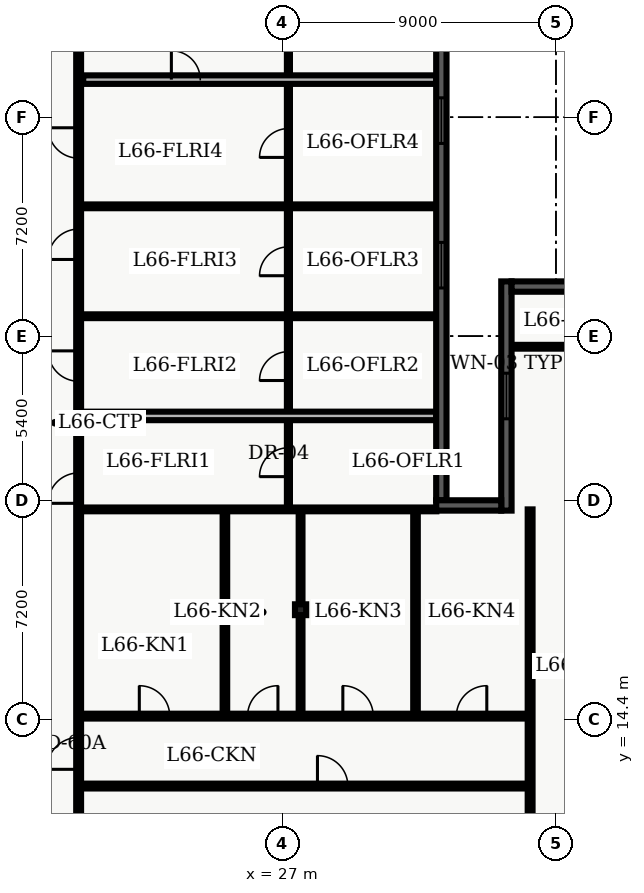
"""IFC4 building model, lengths in metres.
Left out: names, types, materials, properties, quantities, classifications, styles, units other than length and angle.
Written with IfcOpenShell. Run it as: python <this file> out.ifc"""

import sys

from ifc_helpers import new_model, entity, si_unit, converted_unit, direction, frame, origin_with_axes, origin_2d_with_axis, place, context, subcontext, project, spatial, polyline, rectangle, i_section, outline, extrude, element, fill, save


model = new_model("IFC4")
c1 = context("Model", 3, precision=1e-05, world=origin_with_axes(), true_north=direction((0.0, 1.0)))
c2 = subcontext(c1, "Body", "Model", "MODEL_VIEW")
j1 = project(units=[si_unit("LENGTHUNIT", "METRE"), converted_unit("PLANEANGLEUNIT", "DEGREE", entity("IfcPlaneAngleMeasure", 0.017), si_unit("PLANEANGLEUNIT", "RADIAN"), dimensions=[0, 0, 0, 0, 0, 0, 0])], contexts=[c1])
p1 = place(None, origin_with_axes())
s1 = spatial("IfcSite", under=j1, at=p1, CompositionType="ELEMENT")
p2 = place(p1, origin_with_axes())
s2 = spatial("IfcBuilding", under=s1, at=p2, CompositionType="ELEMENT")
p3 = place(p2, frame((0.0, 0.0, 268.5), z_axis=(0.0, 0.0, 1.0), x_axis=(1.0, 0.0, 0.0)))
s3 = spatial("IfcBuildingStorey", under=s2, at=p3, CompositionType="ELEMENT", Elevation=268.5)
p4 = place(p3, frame((27.6, 18.0, 0.0), z_axis=(0.0, 0.0, 1.0), x_axis=(1.0, 0.0, 0.0)))
e1 = element("IfcColumn", 1, at=p4, inside=s3, PredefinedType="COLUMN", context=c2, shape_type="SweptSolid", body=[
    extrude(i_section(OverallWidth=0.369, OverallDepth=0.356, WebThickness=0.011, FlangeThickness=0.018, FilletRadius=0.018, at=origin_2d_with_axis()), origin_with_axes(), (0.0, 0.0, 1.0), 3.9),
])
p5 = place(p3, frame((20.3, 7.8, 0.0), z_axis=(0.0, 0.0, 1.0), x_axis=(0.0, 1.0, 0.0)))
e2 = element("IfcWall", 2, at=p5, inside=s3, PredefinedType="PARTITIONING", context=c2, shape_type="SweptSolid", body=[
    extrude(outline(polyline([(0.0, -0.08), (32.7, -0.08), (32.7, 0.08), (0.0, 0.08), (0.0, -0.08)])), origin_with_axes(), (0.0, 0.0, 1.0), 2.7),
])
p6 = place(p5, frame((14.2, 0.0, 0.0), z_axis=(0.0, 0.0, 1.0), x_axis=(1.0, 0.0, 0.0)))
e3 = element("IfcOpeningElement", 3, at=p6, cuts=e2, PredefinedType="OPENING", context=c2, shape_type="SweptSolid", body=[
    extrude(rectangle(XDim=1.0, YDim=0.18, at=origin_2d_with_axis()), origin_with_axes(), (0.0, 0.0, 1.0), 2.15),
])
p7 = place(p5, frame((18.215, 0.0, 0.0), z_axis=(0.0, 0.0, 1.0), x_axis=(1.0, 0.0, 0.0)))
e4 = element("IfcOpeningElement", 4, at=p7, cuts=e2, PredefinedType="OPENING", context=c2, shape_type="SweptSolid", body=[
    extrude(rectangle(XDim=1.0, YDim=0.18, at=origin_2d_with_axis()), origin_with_axes(), (0.0, 0.0, 1.0), 2.15),
])
p8 = place(p5, frame((22.221, 0.0, 0.0), z_axis=(0.0, 0.0, 1.0), x_axis=(1.0, 0.0, 0.0)))
e5 = element("IfcOpeningElement", 5, at=p8, cuts=e2, PredefinedType="OPENING", context=c2, shape_type="SweptSolid", body=[
    extrude(rectangle(XDim=1.0, YDim=0.18, at=origin_2d_with_axis()), origin_with_axes(), (0.0, 0.0, 1.0), 2.15),
])
p9 = place(p5, frame((25.553, 0.0, 0.0), z_axis=(0.0, 0.0, 1.0), x_axis=(1.0, 0.0, 0.0)))
e6 = element("IfcOpeningElement", 6, at=p9, cuts=e2, PredefinedType="OPENING", context=c2, shape_type="SweptSolid", body=[
    extrude(rectangle(XDim=1.0, YDim=0.18, at=origin_2d_with_axis()), origin_with_axes(), (0.0, 0.0, 1.0), 2.15),
])
p10 = place(p5, frame((5.475, 0.0, 0.0), z_axis=(0.0, 0.0, 1.0), x_axis=(1.0, 0.0, 0.0)))
e7 = element("IfcOpeningElement", 7, at=p10, cuts=e2, PredefinedType="OPENING", context=c2, shape_type="SweptSolid", body=[
    extrude(rectangle(XDim=1.05, YDim=0.18, at=origin_2d_with_axis()), origin_with_axes(), (0.0, 0.0, 1.0), 2.15),
])
p11 = place(p3, frame((27.2, 21.4, 0.0), z_axis=(0.0, 0.0, 1.0), x_axis=(0.0, 1.0, 0.0)))
e8 = element("IfcWall", 8, at=p11, inside=s3, PredefinedType="PARTITIONING", context=c2, shape_type="SweptSolid", body=[
    extrude(outline(polyline([(0.0, -0.05), (18.9, -0.05), (18.9, 0.05), (0.0, 0.05), (0.0, -0.05)])), origin_with_axes(), (0.0, 0.0, 1.0), 2.7),
])
p12 = place(p11, frame((1.452, 0.0, 0.0), z_axis=(0.0, 0.0, 1.0), x_axis=(1.0, 0.0, 0.0)))
e9 = element("IfcOpeningElement", 9, at=p12, cuts=e8, PredefinedType="OPENING", context=c2, shape_type="SweptSolid", body=[
    extrude(rectangle(XDim=0.95, YDim=0.12, at=origin_2d_with_axis()), origin_with_axes(), (0.0, 0.0, 1.0), 2.15),
])
p13 = place(p11, frame((4.614, 0.0, 0.0), z_axis=(0.0, 0.0, 1.0), x_axis=(1.0, 0.0, 0.0)))
e10 = element("IfcOpeningElement", 10, at=p13, cuts=e8, PredefinedType="OPENING", context=c2, shape_type="SweptSolid", body=[
    extrude(rectangle(XDim=0.95, YDim=0.12, at=origin_2d_with_axis()), origin_with_axes(), (0.0, 0.0, 1.0), 2.15),
])
p14 = place(p11, frame((8.062, 0.0, 0.0), z_axis=(0.0, 0.0, 1.0), x_axis=(1.0, 0.0, 0.0)))
e11 = element("IfcOpeningElement", 11, at=p14, cuts=e8, PredefinedType="OPENING", context=c2, shape_type="SweptSolid", body=[
    extrude(rectangle(XDim=0.95, YDim=0.12, at=origin_2d_with_axis()), origin_with_axes(), (0.0, 0.0, 1.0), 2.15),
])
p15 = place(p11, frame((11.953, 0.0, 0.0), z_axis=(0.0, 0.0, 1.0), x_axis=(1.0, 0.0, 0.0)))
e12 = element("IfcOpeningElement", 12, at=p15, cuts=e8, PredefinedType="OPENING", context=c2, shape_type="SweptSolid", body=[
    extrude(rectangle(XDim=0.95, YDim=0.12, at=origin_2d_with_axis()), origin_with_axes(), (0.0, 0.0, 1.0), 2.15),
])
p16 = place(p11, frame((16.503, 0.0, 0.0), z_axis=(0.0, 0.0, 1.0), x_axis=(1.0, 0.0, 0.0)))
e13 = element("IfcOpeningElement", 13, at=p16, cuts=e8, PredefinedType="OPENING", context=c2, shape_type="SweptSolid", body=[
    extrude(rectangle(XDim=0.95, YDim=0.12, at=origin_2d_with_axis()), origin_with_axes(), (0.0, 0.0, 1.0), 2.15),
])
p17 = place(p3, frame((20.45, 24.375, 0.0), z_axis=(0.0, 0.0, 1.0), x_axis=(1.0, 0.0, 0.0)))
e14 = element("IfcWall", 14, at=p17, inside=s3, PredefinedType="PARTITIONING", context=c2, shape_type="SweptSolid", body=[
    extrude(outline(polyline([(0.0, -0.14), (11.615, -0.14), (11.615, 0.14), (0.0, 0.14), (0.0, -0.14)])), origin_with_axes(), (0.0, 0.0, 1.0), 2.7),
])
for number, where, z_axis, x_axis in (
    (15, (20.45, 27.654, 0.0), (0.0, 0.0, 1.0), (1.0, 0.0, 0.0)),
    (16, (20.45, 31.269, 0.0), (0.0, 0.0, 1.0), (1.0, 0.0, 0.0)),
):
    element("IfcWall", number, at=place(p3, frame(where, z_axis=z_axis, x_axis=x_axis)), inside=s3, PredefinedType="PARTITIONING", context=c2, shape_type="SweptSolid", body=[
        extrude(outline(polyline([(0.0, -0.062), (11.615, -0.062), (11.615, 0.062), (0.0, 0.062), (0.0, -0.062)])), origin_with_axes(), (0.0, 0.0, 1.0), 2.7),
    ])
p18 = place(p3, frame((20.45, 35.437, 0.0), z_axis=(0.0, 0.0, 1.0), x_axis=(1.0, 0.0, 0.0)))
e17 = element("IfcWall", 17, at=p18, inside=s3, PredefinedType="PARTITIONING", context=c2, shape_type="SweptSolid", body=[
    extrude(outline(polyline([(0.0, -0.14), (11.615, -0.14), (11.615, 0.14), (0.0, 0.14), (0.0, -0.14)])), origin_with_axes(), (0.0, 0.0, 1.0), 2.7),
])
p19 = place(p18, frame((3.375, 0.0, 0.0), z_axis=(0.0, 0.0, 1.0), x_axis=(1.0, 0.0, 0.0)))
e18 = element("IfcOpeningElement", 18, at=p19, cuts=e17, PredefinedType="OPENING", context=c2, shape_type="SweptSolid", body=[
    extrude(rectangle(XDim=0.95, YDim=0.3, at=origin_2d_with_axis()), origin_with_axes(), (0.0, 0.0, 1.0), 2.15),
])
p20 = place(p3, frame((20.3, 12.2, 0.0), z_axis=(0.0, 0.0, 1.0), x_axis=(1.0, 0.0, 0.0)))
e19 = element("IfcWall", 19, at=p20, inside=s3, PredefinedType="PARTITIONING", context=c2, shape_type="SweptSolid", body=[
    extrude(outline(polyline([(0.0, -0.08), (14.85, -0.08), (14.85, 0.08), (0.0, 0.08), (0.0, -0.08)])), origin_with_axes(), (0.0, 0.0, 1.0), 2.7),
])
p21 = place(p20, frame((8.355, 0.0, 0.0), z_axis=(0.0, 0.0, 1.0), x_axis=(1.0, 0.0, 0.0)))
e20 = element("IfcOpeningElement", 20, at=p21, cuts=e19, PredefinedType="OPENING", context=c2, shape_type="SweptSolid", body=[
    extrude(rectangle(XDim=1.0, YDim=0.18, at=origin_2d_with_axis()), origin_with_axes(), (0.0, 0.0, 1.0), 2.15),
])
p22 = place(p3, frame((20.3, 14.5, 0.0), z_axis=(0.0, 0.0, 1.0), x_axis=(1.0, 0.0, 0.0)))
e21 = element("IfcWall", 21, at=p22, inside=s3, PredefinedType="PARTITIONING", context=c2, shape_type="SweptSolid", body=[
    extrude(outline(polyline([(0.0, -0.08), (14.85, -0.08), (14.85, 0.08), (0.0, 0.08), (0.0, -0.08)])), origin_with_axes(), (0.0, 0.0, 1.0), 2.7),
])
p23 = place(p22, frame((2.495, 0.0, 0.0), z_axis=(0.0, 0.0, 1.0), x_axis=(1.0, 0.0, 0.0)))
e22 = element("IfcOpeningElement", 22, at=p23, cuts=e21, PredefinedType="OPENING", context=c2, shape_type="SweptSolid", body=[
    extrude(rectangle(XDim=1.0, YDim=0.18, at=origin_2d_with_axis()), origin_with_axes(), (0.0, 0.0, 1.0), 2.15),
])
p24 = place(p22, frame((6.056, 0.0, 0.0), z_axis=(0.0, 0.0, 1.0), x_axis=(1.0, 0.0, 0.0)))
e23 = element("IfcOpeningElement", 23, at=p24, cuts=e21, PredefinedType="OPENING", context=c2, shape_type="SweptSolid", body=[
    extrude(rectangle(XDim=1.0, YDim=0.18, at=origin_2d_with_axis()), origin_with_axes(), (0.0, 0.0, 1.0), 2.15),
])
p25 = place(p22, frame((9.19, 0.0, 0.0), z_axis=(0.0, 0.0, 1.0), x_axis=(1.0, 0.0, 0.0)))
e24 = element("IfcOpeningElement", 24, at=p25, cuts=e21, PredefinedType="OPENING", context=c2, shape_type="SweptSolid", body=[
    extrude(rectangle(XDim=1.0, YDim=0.18, at=origin_2d_with_axis()), origin_with_axes(), (0.0, 0.0, 1.0), 2.15),
])
p26 = place(p22, frame((12.925, 0.0, 0.0), z_axis=(0.0, 0.0, 1.0), x_axis=(1.0, 0.0, 0.0)))
e25 = element("IfcOpeningElement", 25, at=p26, cuts=e21, PredefinedType="OPENING", context=c2, shape_type="SweptSolid", body=[
    extrude(rectangle(XDim=1.0, YDim=0.18, at=origin_2d_with_axis()), origin_with_axes(), (0.0, 0.0, 1.0), 2.15),
])
p27 = place(p3, frame((35.15, 4.35, 0.0), z_axis=(0.0, 0.0, 1.0), x_axis=(0.0, 1.0, 0.0)))
e26 = element("IfcWall", 26, at=p27, inside=s3, PredefinedType="PARTITIONING", context=c2, shape_type="SweptSolid", body=[
    extrude(outline(polyline([(0.0, -0.08), (16.95, -0.08), (16.95, 0.08), (0.0, 0.08), (0.0, -0.08)])), origin_with_axes(), (0.0, 0.0, 1.0), 2.7),
])
p28 = place(p3, frame((25.111, 14.62, 0.0), z_axis=(0.0, 0.0, 1.0), x_axis=(0.0, 1.0, 0.0)))
e27 = element("IfcWall", 27, at=p28, inside=s3, PredefinedType="PARTITIONING", context=c2, shape_type="SweptSolid", body=[
    extrude(outline(polyline([(0.0, -0.075), (6.6, -0.075), (6.6, 0.075), (0.0, 0.075), (0.0, -0.075)])), origin_with_axes(), (0.0, 0.0, 1.0), 2.7),
])
p29 = place(p3, frame((27.6, 14.62, 0.0), z_axis=(0.0, 0.0, 1.0), x_axis=(0.0, 1.0, 0.0)))
e28 = element("IfcWall", 28, at=p29, inside=s3, PredefinedType="PARTITIONING", context=c2, shape_type="SweptSolid", body=[
    extrude(outline(polyline([(0.0, -0.062), (6.6, -0.062), (6.6, 0.062), (0.0, 0.062), (0.0, -0.062)])), origin_with_axes(), (0.0, 0.0, 1.0), 2.7),
])
p30 = place(p3, frame((31.38, 14.62, 0.0), z_axis=(0.0, 0.0, 1.0), x_axis=(0.0, 1.0, 0.0)))
e29 = element("IfcWall", 29, at=p30, inside=s3, PredefinedType="PARTITIONING", context=c2, shape_type="SweptSolid", body=[
    extrude(outline(polyline([(0.0, -0.075), (6.6, -0.075), (6.6, 0.075), (0.0, 0.075), (0.0, -0.075)])), origin_with_axes(), (0.0, 0.0, 1.0), 2.7),
])
p31 = place(p3, frame((34.535, 26.65, 0.0), z_axis=(0.0, 0.0, 1.0), x_axis=(1.0, 0.0, 0.0)))
e30 = element("IfcWall", 30, at=p31, inside=s3, PredefinedType="PARTITIONING", context=c2, shape_type="SweptSolid", body=[
    extrude(outline(polyline([(0.0, -0.062), (12.995, -0.062), (12.995, 0.062), (0.0, 0.062), (0.0, -0.062)])), origin_with_axes(), (0.0, 0.0, 1.0), 2.7),
])
p32 = place(p31, frame((8.465, 0.0, 0.0), z_axis=(0.0, 0.0, 1.0), x_axis=(1.0, 0.0, 0.0)))
e31 = element("IfcOpeningElement", 31, at=p32, cuts=e30, PredefinedType="OPENING", context=c2, shape_type="SweptSolid", body=[
    extrude(rectangle(XDim=1.0, YDim=0.145, at=origin_2d_with_axis()), origin_with_axes(), (0.0, 0.0, 1.0), 2.15),
])
p33 = place(p3, frame((20.3, 21.3, 0.0), z_axis=(0.0, 0.0, 1.0), x_axis=(1.0, 0.0, 0.0)))
e32 = element("IfcWall", 32, at=p33, inside=s3, PredefinedType="PARTITIONING", context=c2, shape_type="SweptSolid", body=[
    extrude(outline(polyline([(0.0, -0.062), (11.765, -0.062), (11.765, 0.062), (0.0, 0.062), (0.0, -0.062)])), origin_with_axes(), (0.0, 0.0, 1.0), 2.7),
])
p34 = place(p3, frame((34.37, 21.26, 0.0), z_axis=(0.0, 0.0, 1.0), x_axis=(0.0, 1.0, 0.0)))
e33 = element("IfcWall", 33, at=p34, inside=s3, PredefinedType="SOLIDWALL", context=c2, shape_type="SweptSolid", body=[
    extrude(outline(polyline([(0.0, -0.17), (7.54, -0.17), (7.54, 0.17), (0.0, 0.17), (0.0, -0.17)])), origin_with_axes(), (0.0, 0.0, 1.0), 3.66),
])
p35 = place(p34, frame((3.77, 0.0, 0.45), z_axis=(0.0, 0.0, 1.0), x_axis=(1.0, 0.0, 0.0)))
e34 = element("IfcOpeningElement", 34, at=p35, cuts=e33, PredefinedType="OPENING", context=c2, shape_type="SweptSolid", body=[
    extrude(rectangle(XDim=1.5, YDim=0.36, at=origin_2d_with_axis()), origin_with_axes(), (0.0, 0.0, 1.0), 2.1),
])
p36 = place(p3, frame((34.54, 28.63, 0.0), z_axis=(0.0, 0.0, 1.0), x_axis=(1.0, 0.0, 0.0)))
e35 = element("IfcWall", 35, at=p36, inside=s3, PredefinedType="SOLIDWALL", context=c2, shape_type="SweptSolid", body=[
    extrude(outline(polyline([(0.0, -0.17), (13.16, -0.17), (13.16, 0.17), (0.0, 0.17), (0.0, -0.17)])), origin_with_axes(), (0.0, 0.0, 1.0), 3.66),
])
p37 = place(p36, frame((3.59, 0.0, 0.45), z_axis=(0.0, 0.0, 1.0), x_axis=(1.0, 0.0, 0.0)))
e36 = element("IfcOpeningElement", 36, at=p37, cuts=e35, PredefinedType="OPENING", context=c2, shape_type="SweptSolid", body=[
    extrude(rectangle(XDim=1.5, YDim=0.36, at=origin_2d_with_axis()), origin_with_axes(), (0.0, 0.0, 1.0), 2.1),
])
p38 = place(p36, frame((9.57, 0.0, 0.45), z_axis=(0.0, 0.0, 1.0), x_axis=(1.0, 0.0, 0.0)))
e37 = element("IfcOpeningElement", 37, at=p38, cuts=e35, PredefinedType="OPENING", context=c2, shape_type="SweptSolid", body=[
    extrude(rectangle(XDim=1.5, YDim=0.36, at=origin_2d_with_axis()), origin_with_axes(), (0.0, 0.0, 1.0), 2.1),
])
p39 = place(p3, frame((32.23, 41.82, 0.0), z_axis=(0.0, 0.0, 1.0), x_axis=(0.0, -1.0, 0.0)))
e38 = element("IfcWall", 38, at=p39, inside=s3, PredefinedType="SOLIDWALL", context=c2, shape_type="SweptSolid", body=[
    extrude(outline(polyline([(0.0, -0.17), (20.22, -0.17), (20.22, 0.17), (0.0, 0.17), (0.0, -0.17)])), origin_with_axes(), (0.0, 0.0, 1.0), 3.66),
])
p40 = place(p39, frame((2.978, 0.0, 0.45), z_axis=(0.0, 0.0, 1.0), x_axis=(1.0, 0.0, 0.0)))
e39 = element("IfcOpeningElement", 39, at=p40, cuts=e38, PredefinedType="OPENING", context=c2, shape_type="SweptSolid", body=[
    extrude(rectangle(XDim=1.5, YDim=0.36, at=origin_2d_with_axis()), origin_with_axes(), (0.0, 0.0, 1.0), 2.1),
])
p41 = place(p39, frame((7.732, 0.0, 0.45), z_axis=(0.0, 0.0, 1.0), x_axis=(1.0, 0.0, 0.0)))
e40 = element("IfcOpeningElement", 40, at=p41, cuts=e38, PredefinedType="OPENING", context=c2, shape_type="SweptSolid", body=[
    extrude(rectangle(XDim=1.5, YDim=0.36, at=origin_2d_with_axis()), origin_with_axes(), (0.0, 0.0, 1.0), 2.1),
])
p42 = place(p39, frame((12.487, 0.0, 0.45), z_axis=(0.0, 0.0, 1.0), x_axis=(1.0, 0.0, 0.0)))
e41 = element("IfcOpeningElement", 41, at=p42, cuts=e38, PredefinedType="OPENING", context=c2, shape_type="SweptSolid", body=[
    extrude(rectangle(XDim=1.5, YDim=0.36, at=origin_2d_with_axis()), origin_with_axes(), (0.0, 0.0, 1.0), 2.1),
])
p43 = place(p3, frame((32.06, 21.43, 0.0), z_axis=(0.0, 0.0, 1.0), x_axis=(1.0, 0.0, 0.0)))
e42 = element("IfcWall", 42, at=p43, inside=s3, PredefinedType="SOLIDWALL", context=c2, shape_type="SweptSolid", body=[
    extrude(outline(polyline([(0.0, -0.17), (2.14, -0.17), (2.14, 0.17), (0.0, 0.17), (0.0, -0.17)])), origin_with_axes(), (0.0, 0.0, 1.0), 3.66),
])
p44 = place(p11, frame((1.452, 0.0, 0.0), z_axis=(0.0, 0.0, 1.0), x_axis=(1.0, 0.0, 0.0)))
e43 = element("IfcDoor", 43, at=p44, inside=s3, OperationType="SINGLE_SWING_LEFT", PredefinedType="DOOR", context=c2, shape_type="SweptSolid", body=[
    extrude(rectangle(XDim=0.95, YDim=0.06, at=origin_2d_with_axis()), origin_with_axes(), (0.0, 0.0, 1.0), 2.15),
])
fill(e9, e43)
p45 = place(p5, frame((14.2, 0.0, 0.0), z_axis=(0.0, 0.0, 1.0), x_axis=(1.0, 0.0, 0.0)))
e44 = element("IfcDoor", 44, at=p45, inside=s3, OperationType="SINGLE_SWING_LEFT", PredefinedType="DOOR", context=c2, shape_type="SweptSolid", body=[
    extrude(rectangle(XDim=1.0, YDim=0.09, at=origin_2d_with_axis()), origin_with_axes(), (0.0, 0.0, 1.0), 2.15),
])
fill(e3, e44)
p46 = place(p11, frame((4.614, 0.0, 0.0), z_axis=(0.0, 0.0, 1.0), x_axis=(1.0, 0.0, 0.0)))
e45 = element("IfcDoor", 45, at=p46, inside=s3, OperationType="SINGLE_SWING_LEFT", PredefinedType="DOOR", context=c2, shape_type="SweptSolid", body=[
    extrude(rectangle(XDim=0.95, YDim=0.06, at=origin_2d_with_axis()), origin_with_axes(), (0.0, 0.0, 1.0), 2.15),
])
fill(e10, e45)
p47 = place(p5, frame((18.215, 0.0, 0.0), z_axis=(0.0, 0.0, 1.0), x_axis=(1.0, 0.0, 0.0)))
e46 = element("IfcDoor", 46, at=p47, inside=s3, OperationType="SINGLE_SWING_RIGHT", PredefinedType="DOOR", context=c2, shape_type="SweptSolid", body=[
    extrude(rectangle(XDim=1.0, YDim=0.09, at=origin_2d_with_axis()), origin_with_axes(), (0.0, 0.0, 1.0), 2.15),
])
fill(e4, e46)
p48 = place(p11, frame((8.062, 0.0, 0.0), z_axis=(0.0, 0.0, 1.0), x_axis=(1.0, 0.0, 0.0)))
e47 = element("IfcDoor", 47, at=p48, inside=s3, OperationType="SINGLE_SWING_LEFT", PredefinedType="DOOR", context=c2, shape_type="SweptSolid", body=[
    extrude(rectangle(XDim=0.95, YDim=0.06, at=origin_2d_with_axis()), origin_with_axes(), (0.0, 0.0, 1.0), 2.15),
])
fill(e11, e47)
p49 = place(p5, frame((22.221, 0.0, 0.0), z_axis=(0.0, 0.0, 1.0), x_axis=(1.0, 0.0, 0.0)))
e48 = element("IfcDoor", 48, at=p49, inside=s3, OperationType="SINGLE_SWING_LEFT", PredefinedType="DOOR", context=c2, shape_type="SweptSolid", body=[
    extrude(rectangle(XDim=1.0, YDim=0.09, at=origin_2d_with_axis()), origin_with_axes(), (0.0, 0.0, 1.0), 2.15),
])
fill(e5, e48)
p50 = place(p11, frame((11.953, 0.0, 0.0), z_axis=(0.0, 0.0, 1.0), x_axis=(1.0, 0.0, 0.0)))
e49 = element("IfcDoor", 49, at=p50, inside=s3, OperationType="SINGLE_SWING_LEFT", PredefinedType="DOOR", context=c2, shape_type="SweptSolid", body=[
    extrude(rectangle(XDim=0.95, YDim=0.06, at=origin_2d_with_axis()), origin_with_axes(), (0.0, 0.0, 1.0), 2.15),
])
fill(e12, e49)
p51 = place(p5, frame((25.553, 0.0, 0.0), z_axis=(0.0, 0.0, 1.0), x_axis=(1.0, 0.0, 0.0)))
e50 = element("IfcDoor", 50, at=p51, inside=s3, OperationType="SINGLE_SWING_RIGHT", PredefinedType="DOOR", context=c2, shape_type="SweptSolid", body=[
    extrude(rectangle(XDim=1.0, YDim=0.09, at=origin_2d_with_axis()), origin_with_axes(), (0.0, 0.0, 1.0), 2.15),
])
fill(e6, e50)
p52 = place(p18, frame((3.375, 0.0, 0.0), z_axis=(0.0, 0.0, 1.0), x_axis=(1.0, 0.0, 0.0)))
e51 = element("IfcDoor", 51, at=p52, inside=s3, OperationType="SINGLE_SWING_LEFT", PredefinedType="DOOR", context=c2, shape_type="SweptSolid", body=[
    extrude(rectangle(XDim=0.95, YDim=0.09, at=origin_2d_with_axis()), origin_with_axes(), (0.0, 0.0, 1.0), 2.15),
])
fill(e18, e51)
p53 = place(p5, frame((5.475, 0.0, 0.0), z_axis=(0.0, 0.0, 1.0), x_axis=(1.0, 0.0, 0.0)))
e52 = element("IfcDoor", 52, at=p53, inside=s3, OperationType="SINGLE_SWING_LEFT", PredefinedType="DOOR", context=c2, shape_type="SweptSolid", body=[
    extrude(rectangle(XDim=1.05, YDim=0.09, at=origin_2d_with_axis()), origin_with_axes(), (0.0, 0.0, 1.0), 2.15),
])
fill(e7, e52)
p54 = place(p20, frame((8.355, 0.0, 0.0), z_axis=(0.0, 0.0, 1.0), x_axis=(1.0, 0.0, 0.0)))
e53 = element("IfcDoor", 53, at=p54, inside=s3, OperationType="SINGLE_SWING_LEFT", PredefinedType="DOOR", context=c2, shape_type="SweptSolid", body=[
    extrude(rectangle(XDim=1.0, YDim=0.09, at=origin_2d_with_axis()), origin_with_axes(), (0.0, 0.0, 1.0), 2.15),
])
fill(e20, e53)
p55 = place(p22, frame((2.495, 0.0, 0.0), z_axis=(0.0, 0.0, 1.0), x_axis=(1.0, 0.0, 0.0)))
e54 = element("IfcDoor", 54, at=p55, inside=s3, OperationType="SINGLE_SWING_LEFT", PredefinedType="DOOR", context=c2, shape_type="SweptSolid", body=[
    extrude(rectangle(XDim=1.0, YDim=0.09, at=origin_2d_with_axis()), origin_with_axes(), (0.0, 0.0, 1.0), 2.15),
])
fill(e22, e54)
p56 = place(p22, frame((6.056, 0.0, 0.0), z_axis=(0.0, 0.0, 1.0), x_axis=(1.0, 0.0, 0.0)))
e55 = element("IfcDoor", 55, at=p56, inside=s3, OperationType="SINGLE_SWING_RIGHT", PredefinedType="DOOR", context=c2, shape_type="SweptSolid", body=[
    extrude(rectangle(XDim=1.0, YDim=0.09, at=origin_2d_with_axis()), origin_with_axes(), (0.0, 0.0, 1.0), 2.15),
])
fill(e23, e55)
p57 = place(p22, frame((9.19, 0.0, 0.0), z_axis=(0.0, 0.0, 1.0), x_axis=(1.0, 0.0, 0.0)))
e56 = element("IfcDoor", 56, at=p57, inside=s3, OperationType="SINGLE_SWING_LEFT", PredefinedType="DOOR", context=c2, shape_type="SweptSolid", body=[
    extrude(rectangle(XDim=1.0, YDim=0.09, at=origin_2d_with_axis()), origin_with_axes(), (0.0, 0.0, 1.0), 2.15),
])
fill(e24, e56)
p58 = place(p22, frame((12.925, 0.0, 0.0), z_axis=(0.0, 0.0, 1.0), x_axis=(1.0, 0.0, 0.0)))
e57 = element("IfcDoor", 57, at=p58, inside=s3, OperationType="SINGLE_SWING_RIGHT", PredefinedType="DOOR", context=c2, shape_type="SweptSolid", body=[
    extrude(rectangle(XDim=1.0, YDim=0.09, at=origin_2d_with_axis()), origin_with_axes(), (0.0, 0.0, 1.0), 2.15),
])
fill(e25, e57)
p59 = place(p34, frame((3.77, 0.0, 0.45), z_axis=(0.0, 0.0, 1.0), x_axis=(1.0, 0.0, 0.0)))
e58 = element("IfcWindow", 58, at=p59, inside=s3, PredefinedType="WINDOW", context=c2, shape_type="SweptSolid", body=[
    extrude(rectangle(XDim=1.5, YDim=0.09, at=origin_2d_with_axis()), origin_with_axes(), (0.0, 0.0, 1.0), 2.1),
])
fill(e34, e58)
p60 = place(p39, frame((7.732, 0.0, 0.45), z_axis=(0.0, 0.0, 1.0), x_axis=(1.0, 0.0, 0.0)))
e59 = element("IfcWindow", 59, at=p60, inside=s3, PredefinedType="WINDOW", context=c2, shape_type="SweptSolid", body=[
    extrude(rectangle(XDim=1.5, YDim=0.09, at=origin_2d_with_axis()), origin_with_axes(), (0.0, 0.0, 1.0), 2.1),
])
fill(e40, e59)
p61 = place(p39, frame((12.487, 0.0, 0.45), z_axis=(0.0, 0.0, 1.0), x_axis=(1.0, 0.0, 0.0)))
e60 = element("IfcWindow", 60, at=p61, inside=s3, PredefinedType="WINDOW", context=c2, shape_type="SweptSolid", body=[
    extrude(rectangle(XDim=1.5, YDim=0.09, at=origin_2d_with_axis()), origin_with_axes(), (0.0, 0.0, 1.0), 2.1),
])
fill(e41, e60)
save(model, sys.argv[1])
